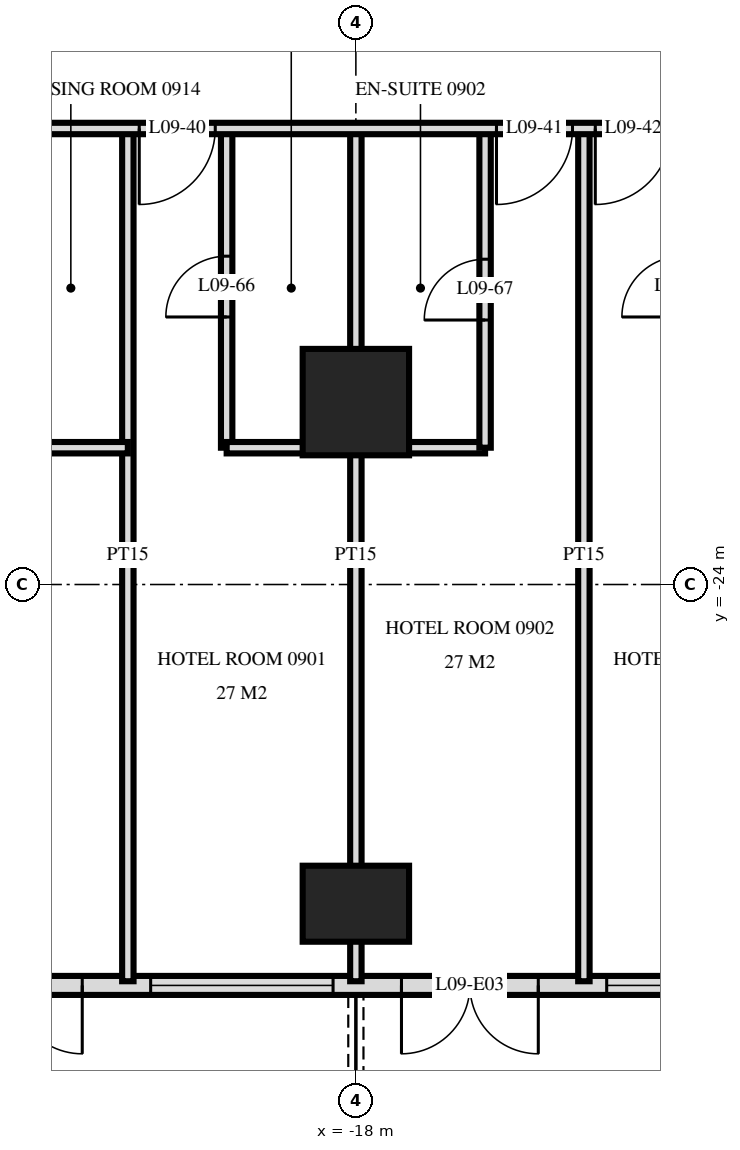
"""IFC4 building model, lengths in metres.
Left out: names, types, materials, properties, quantities, classifications, styles, units other than length and angle.
Written with IfcOpenShell. Run it as: python <this file> out.ifc"""

import sys

from ifc_helpers import new_model, si_unit, direction, frame, frame_2d, origin, origin_2d, place, context, subcontext, project, spatial, rectangle, extrude, element, fill, save


model = new_model("IFC4")
c1 = context("Model", 3, precision=1e-05, world=origin(), true_north=direction((0.0, 1.0)))
c2 = subcontext(c1, "Body", "Model", "MODEL_VIEW")
j1 = project(units=[si_unit("LENGTHUNIT", "METRE"), si_unit("PLANEANGLEUNIT", "RADIAN")], contexts=[c1])
p1 = place(None, origin())
s1 = spatial("IfcSite", under=j1, at=p1, CompositionType="ELEMENT")
p2 = place(p1, origin())
s2 = spatial("IfcBuilding", under=s1, at=p2, CompositionType="ELEMENT")
p3 = place(p2, frame((0.0, 0.0, 42.0)))
s3 = spatial("IfcBuildingStorey", under=s2, at=p3, CompositionType="ELEMENT", Elevation=42.0)
p4 = place(p3, frame((-18.0, -28.2, 0.0), z_axis=(0.0, 0.0, 1.0), x_axis=(1.0, 0.0, 0.0)))
e1 = element("IfcColumn", 1, at=p4, inside=s3, PredefinedType="COLUMN", context=c2, shape_type="SweptSolid", body=[
    extrude(rectangle(XDim=1.4, YDim=1.0, at=origin_2d()), origin(), (0.0, 0.0, 1.0), 3.6),
])
p5 = place(p3, frame((-18.0, -21.6, 0.0), z_axis=(0.0, 0.0, 1.0), x_axis=(1.0, 0.0, 0.0)))
e2 = element("IfcColumn", 2, at=p5, inside=s3, PredefinedType="COLUMN", context=c2, shape_type="SweptSolid", body=[
    extrude(rectangle(XDim=1.4, YDim=1.4, at=origin_2d()), origin(), (0.0, 0.0, 1.0), 3.6),
])
p6 = place(p3, frame((-28.775, -29.275, 0.0), z_axis=(0.0, 0.0, 1.0), x_axis=(1.0, 0.0, 0.0)))
e3 = element("IfcWall", 3, at=p6, inside=s3, PredefinedType="SOLIDWALL", context=c2, shape_type="SweptSolid", body=[
    extrude(rectangle(XDim=57.551, YDim=0.25, at=frame_2d((28.775, 0.0))), origin(), (0.0, 0.0, 1.0), 3.32),
])
p7 = place(p6, frame((0.575, 0.0, 0.0)))
e4 = element("IfcOpeningElement", 4, at=p7, cuts=e3, PredefinedType="OPENING", context=c2, shape_type="SweptSolid", body=[
    extrude(rectangle(XDim=1.8, YDim=2.4, at=frame_2d((0.9, 1.2))), frame((0.0, 0.135, 0.0), z_axis=(0.0, -1.0, 0.0), x_axis=(1.0, 0.0, 0.0)), (0.0, 0.0, 1.0), 0.27),
])
p8 = place(p6, frame((5.375, 0.0, 0.0)))
e5 = element("IfcOpeningElement", 5, at=p8, cuts=e3, PredefinedType="OPENING", context=c2, shape_type="SweptSolid", body=[
    extrude(rectangle(XDim=1.8, YDim=2.4, at=frame_2d((0.9, 1.2))), frame((0.0, 0.135, 0.0), z_axis=(0.0, -1.0, 0.0), x_axis=(1.0, 0.0, 0.0)), (0.0, 0.0, 1.0), 0.27),
])
p9 = place(p6, frame((8.075, 0.0, 0.3)))
e6 = element("IfcOpeningElement", 6, at=p9, cuts=e3, PredefinedType="OPENING", context=c2, shape_type="SweptSolid", body=[
    extrude(rectangle(XDim=2.4, YDim=2.1, at=frame_2d((1.2, 1.05))), frame((0.0, 0.135, 0.0), z_axis=(0.0, -1.0, 0.0), x_axis=(1.0, 0.0, 0.0)), (0.0, 0.0, 1.0), 0.27),
])
p10 = place(p6, frame((11.375, 0.0, 0.0)))
e7 = element("IfcOpeningElement", 7, at=p10, cuts=e3, PredefinedType="OPENING", context=c2, shape_type="SweptSolid", body=[
    extrude(rectangle(XDim=1.8, YDim=2.4, at=frame_2d((0.9, 1.2))), frame((0.0, 0.135, 0.0), z_axis=(0.0, -1.0, 0.0), x_axis=(1.0, 0.0, 0.0)), (0.0, 0.0, 1.0), 0.27),
])
p11 = place(p6, frame((14.075, 0.0, 0.3)))
e8 = element("IfcOpeningElement", 8, at=p11, cuts=e3, PredefinedType="OPENING", context=c2, shape_type="SweptSolid", body=[
    extrude(rectangle(XDim=2.4, YDim=2.1, at=frame_2d((1.2, 1.05))), frame((0.0, 0.135, 0.0), z_axis=(0.0, -1.0, 0.0), x_axis=(1.0, 0.0, 0.0)), (0.0, 0.0, 1.0), 0.27),
])
p12 = place(p6, frame((17.375, 0.0, 0.0)))
e9 = element("IfcOpeningElement", 9, at=p12, cuts=e3, PredefinedType="OPENING", context=c2, shape_type="SweptSolid", body=[
    extrude(rectangle(XDim=1.8, YDim=2.4, at=frame_2d((0.9, 1.2))), frame((0.0, 0.135, 0.0), z_axis=(0.0, -1.0, 0.0), x_axis=(1.0, 0.0, 0.0)), (0.0, 0.0, 1.0), 0.27),
])
p13 = place(p6, frame((20.075, 0.0, 0.3)))
e10 = element("IfcOpeningElement", 10, at=p13, cuts=e3, PredefinedType="OPENING", context=c2, shape_type="SweptSolid", body=[
    extrude(rectangle(XDim=2.4, YDim=2.1, at=frame_2d((1.2, 1.05))), frame((0.0, 0.135, 0.0), z_axis=(0.0, -1.0, 0.0), x_axis=(1.0, 0.0, 0.0)), (0.0, 0.0, 1.0), 0.27),
])
p14 = place(p6, frame((23.075, 0.0, 0.3)))
e11 = element("IfcOpeningElement", 11, at=p14, cuts=e3, PredefinedType="OPENING", context=c2, shape_type="SweptSolid", body=[
    extrude(rectangle(XDim=2.4, YDim=2.1, at=frame_2d((1.2, 1.05))), frame((0.0, 0.135, 0.0), z_axis=(0.0, -1.0, 0.0), x_axis=(1.0, 0.0, 0.0)), (0.0, 0.0, 1.0), 0.27),
])
p15 = place(p6, frame((26.375, 0.0, 0.0)))
e12 = element("IfcOpeningElement", 12, at=p15, cuts=e3, PredefinedType="OPENING", context=c2, shape_type="SweptSolid", body=[
    extrude(rectangle(XDim=1.8, YDim=2.4, at=frame_2d((0.9, 1.2))), frame((0.0, 0.135, 0.0), z_axis=(0.0, -1.0, 0.0), x_axis=(1.0, 0.0, 0.0)), (0.0, 0.0, 1.0), 0.27),
])
p16 = place(p6, frame((29.375, 0.0, 0.0)))
e13 = element("IfcOpeningElement", 13, at=p16, cuts=e3, PredefinedType="OPENING", context=c2, shape_type="SweptSolid", body=[
    extrude(rectangle(XDim=1.8, YDim=2.4, at=frame_2d((0.9, 1.2))), frame((0.0, 0.135, 0.0), z_axis=(0.0, -1.0, 0.0), x_axis=(1.0, 0.0, 0.0)), (0.0, 0.0, 1.0), 0.27),
])
p17 = place(p6, frame((32.075, 0.0, 0.3)))
e14 = element("IfcOpeningElement", 14, at=p17, cuts=e3, PredefinedType="OPENING", context=c2, shape_type="SweptSolid", body=[
    extrude(rectangle(XDim=2.4, YDim=2.1, at=frame_2d((1.2, 1.05))), frame((0.0, 0.135, 0.0), z_axis=(0.0, -1.0, 0.0), x_axis=(1.0, 0.0, 0.0)), (0.0, 0.0, 1.0), 0.27),
])
p18 = place(p6, frame((35.375, 0.0, 0.0)))
e15 = element("IfcOpeningElement", 15, at=p18, cuts=e3, PredefinedType="OPENING", context=c2, shape_type="SweptSolid", body=[
    extrude(rectangle(XDim=1.8, YDim=2.4, at=frame_2d((0.9, 1.2))), frame((0.0, 0.135, 0.0), z_axis=(0.0, -1.0, 0.0), x_axis=(1.0, 0.0, 0.0)), (0.0, 0.0, 1.0), 0.27),
])
p19 = place(p6, frame((38.075, 0.0, 0.3)))
e16 = element("IfcOpeningElement", 16, at=p19, cuts=e3, PredefinedType="OPENING", context=c2, shape_type="SweptSolid", body=[
    extrude(rectangle(XDim=2.4, YDim=2.1, at=frame_2d((1.2, 1.05))), frame((0.0, 0.135, 0.0), z_axis=(0.0, -1.0, 0.0), x_axis=(1.0, 0.0, 0.0)), (0.0, 0.0, 1.0), 0.27),
])
p20 = place(p6, frame((41.375, 0.0, 0.0)))
e17 = element("IfcOpeningElement", 17, at=p20, cuts=e3, PredefinedType="OPENING", context=c2, shape_type="SweptSolid", body=[
    extrude(rectangle(XDim=1.8, YDim=2.4, at=frame_2d((0.9, 1.2))), frame((0.0, 0.135, 0.0), z_axis=(0.0, -1.0, 0.0), x_axis=(1.0, 0.0, 0.0)), (0.0, 0.0, 1.0), 0.27),
])
p21 = place(p6, frame((44.075, 0.0, 0.3)))
e18 = element("IfcOpeningElement", 18, at=p21, cuts=e3, PredefinedType="OPENING", context=c2, shape_type="SweptSolid", body=[
    extrude(rectangle(XDim=2.4, YDim=2.1, at=frame_2d((1.2, 1.05))), frame((0.0, 0.135, 0.0), z_axis=(0.0, -1.0, 0.0), x_axis=(1.0, 0.0, 0.0)), (0.0, 0.0, 1.0), 0.27),
])
p22 = place(p6, frame((47.375, 0.0, 0.0)))
e19 = element("IfcOpeningElement", 19, at=p22, cuts=e3, PredefinedType="OPENING", context=c2, shape_type="SweptSolid", body=[
    extrude(rectangle(XDim=1.8, YDim=2.4, at=frame_2d((0.9, 1.2))), frame((0.0, 0.135, 0.0), z_axis=(0.0, -1.0, 0.0), x_axis=(1.0, 0.0, 0.0)), (0.0, 0.0, 1.0), 0.27),
])
p23 = place(p6, frame((50.075, 0.0, 0.3)))
e20 = element("IfcOpeningElement", 20, at=p23, cuts=e3, PredefinedType="OPENING", context=c2, shape_type="SweptSolid", body=[
    extrude(rectangle(XDim=2.4, YDim=2.1, at=frame_2d((1.2, 1.05))), frame((0.0, 0.135, 0.0), z_axis=(0.0, -1.0, 0.0), x_axis=(1.0, 0.0, 0.0)), (0.0, 0.0, 1.0), 0.27),
])
p24 = place(p6, frame((53.375, 0.0, 0.0)))
e21 = element("IfcOpeningElement", 21, at=p24, cuts=e3, PredefinedType="OPENING", context=c2, shape_type="SweptSolid", body=[
    extrude(rectangle(XDim=1.8, YDim=2.4, at=frame_2d((0.9, 1.2))), frame((0.0, 0.135, 0.0), z_axis=(0.0, -1.0, 0.0), x_axis=(1.0, 0.0, 0.0)), (0.0, 0.0, 1.0), 0.27),
])
p25 = place(p3, frame((-15.0, -29.22, 0.0), z_axis=(0.0, 0.0, 1.0), x_axis=(0.0, 1.0, 0.0)))
e22 = element("IfcWall", 22, at=p25, inside=s3, PredefinedType="PARTITIONING", context=c2, shape_type="SweptSolid", body=[
    extrude(rectangle(XDim=11.22, YDim=0.15, at=frame_2d((5.61, 0.0))), origin(), (0.0, 0.0, 1.0), 3.32),
])
p26 = place(p3, frame((-16.3, -22.2, 0.0), z_axis=(0.0, 0.0, 1.0), x_axis=(0.0, 1.0, 0.0)))
e23 = element("IfcWall", 23, at=p26, inside=s3, PredefinedType="PARTITIONING", context=c2, shape_type="SweptSolid", body=[
    extrude(rectangle(XDim=4.2, YDim=0.15, at=frame_2d((2.1, 0.0))), origin(), (0.0, 0.0, 1.0), 3.32),
])
p27 = place(p26, frame((1.68, 0.0, 0.0)))
e24 = element("IfcOpeningElement", 24, at=p27, cuts=e23, PredefinedType="OPENING", context=c2, shape_type="SweptSolid", body=[
    extrude(rectangle(XDim=0.8, YDim=2.1, at=frame_2d((0.4, 1.05))), frame((0.0, 0.085, 0.0), z_axis=(0.0, -1.0, 0.0), x_axis=(1.0, 0.0, 0.0)), (0.0, 0.0, 1.0), 0.17),
])
p28 = place(p3, frame((-18.0, -29.22, 0.0), z_axis=(0.0, 0.0, 1.0), x_axis=(0.0, 1.0, 0.0)))
e25 = element("IfcWall", 25, at=p28, inside=s3, PredefinedType="PARTITIONING", context=c2, shape_type="SweptSolid", body=[
    extrude(rectangle(XDim=11.22, YDim=0.15, at=frame_2d((5.61, 0.0))), origin(), (0.0, 0.0, 1.0), 3.32),
])
p29 = place(p3, frame((-19.7, -22.2, 0.0), z_axis=(0.0, 0.0, 1.0), x_axis=(0.0, 1.0, 0.0)))
e26 = element("IfcWall", 26, at=p29, inside=s3, PredefinedType="PARTITIONING", context=c2, shape_type="SweptSolid", body=[
    extrude(rectangle(XDim=4.2, YDim=0.15, at=frame_2d((2.1, 0.0))), origin(), (0.0, 0.0, 1.0), 3.32),
])
p30 = place(p29, frame((1.72, 0.0, 0.0)))
e27 = element("IfcOpeningElement", 27, at=p30, cuts=e26, PredefinedType="OPENING", context=c2, shape_type="SweptSolid", body=[
    extrude(rectangle(XDim=0.8, YDim=2.1, at=frame_2d((0.4, 1.05))), frame((0.0, 0.085, 0.0), z_axis=(0.0, -1.0, 0.0), x_axis=(1.0, 0.0, 0.0)), (0.0, 0.0, 1.0), 0.17),
])
p31 = place(p3, frame((-21.0, -29.22, 0.0), z_axis=(0.0, 0.0, 1.0), x_axis=(0.0, 1.0, 0.0)))
e28 = element("IfcWall", 28, at=p31, inside=s3, PredefinedType="PARTITIONING", context=c2, shape_type="SweptSolid", body=[
    extrude(rectangle(XDim=11.22, YDim=0.15, at=frame_2d((5.61, 0.0))), origin(), (0.0, 0.0, 1.0), 3.32),
])
p32 = place(p3, frame((-22.5, -22.2, 0.0), z_axis=(0.0, 0.0, 1.0), x_axis=(1.0, 0.0, 0.0)))
e29 = element("IfcWall", 29, at=p32, inside=s3, PredefinedType="PARTITIONING", context=c2, shape_type="SweptSolid", body=[
    extrude(rectangle(XDim=1.5, YDim=0.15, at=frame_2d((0.75, 0.0))), origin(), (0.0, 0.0, 1.0), 3.32),
])
p33 = place(p3, frame((-19.7, -22.2, 0.0), z_axis=(0.0, 0.0, 1.0), x_axis=(1.0, 0.0, 0.0)))
e30 = element("IfcWall", 30, at=p33, inside=s3, PredefinedType="PARTITIONING", context=c2, shape_type="SweptSolid", body=[
    extrude(rectangle(XDim=3.4, YDim=0.15, at=frame_2d((1.7, 0.0))), origin(), (0.0, 0.0, 1.0), 3.32),
])
p34 = place(p3, frame((-33.12, -18.0, 0.0), z_axis=(0.0, 0.0, 1.0), x_axis=(1.0, 0.0, 0.0)))
e31 = element("IfcWall", 31, at=p34, inside=s3, PredefinedType="PARTITIONING", context=c2, shape_type="SweptSolid", body=[
    extrude(rectangle(XDim=66.24, YDim=0.15, at=frame_2d((33.12, 0.0))), origin(), (0.0, 0.0, 1.0), 3.32),
])
p35 = place(p34, frame((12.27, 0.0, 0.0)))
e32 = element("IfcOpeningElement", 32, at=p35, cuts=e31, PredefinedType="OPENING", context=c2, shape_type="SweptSolid", body=[
    extrude(rectangle(XDim=1.0, YDim=2.1, at=frame_2d((0.5, 1.05))), frame((0.0, 0.085, 0.0), z_axis=(0.0, -1.0, 0.0), x_axis=(1.0, 0.0, 0.0)), (0.0, 0.0, 1.0), 0.17),
])
p36 = place(p34, frame((16.97, 0.0, 0.0)))
e33 = element("IfcOpeningElement", 33, at=p36, cuts=e31, PredefinedType="OPENING", context=c2, shape_type="SweptSolid", body=[
    extrude(rectangle(XDim=1.0, YDim=2.1, at=frame_2d((0.5, 1.05))), frame((0.0, 0.085, 0.0), z_axis=(0.0, -1.0, 0.0), x_axis=(1.0, 0.0, 0.0)), (0.0, 0.0, 1.0), 0.17),
])
p37 = place(p34, frame((18.27, 0.0, 0.0)))
e34 = element("IfcOpeningElement", 34, at=p37, cuts=e31, PredefinedType="OPENING", context=c2, shape_type="SweptSolid", body=[
    extrude(rectangle(XDim=1.0, YDim=2.1, at=frame_2d((0.5, 1.05))), frame((0.0, 0.085, 0.0), z_axis=(0.0, -1.0, 0.0), x_axis=(1.0, 0.0, 0.0)), (0.0, 0.0, 1.0), 0.17),
])
p38 = place(p34, frame((22.97, 0.0, 0.0)))
e35 = element("IfcOpeningElement", 35, at=p38, cuts=e31, PredefinedType="OPENING", context=c2, shape_type="SweptSolid", body=[
    extrude(rectangle(XDim=1.0, YDim=2.1, at=frame_2d((0.5, 1.05))), frame((0.0, 0.085, 0.0), z_axis=(0.0, -1.0, 0.0), x_axis=(1.0, 0.0, 0.0)), (0.0, 0.0, 1.0), 0.17),
])
p39 = place(p34, frame((24.27, 0.0, 0.0)))
e36 = element("IfcOpeningElement", 36, at=p39, cuts=e31, PredefinedType="OPENING", context=c2, shape_type="SweptSolid", body=[
    extrude(rectangle(XDim=1.0, YDim=2.1, at=frame_2d((0.5, 1.05))), frame((0.0, 0.085, 0.0), z_axis=(0.0, -1.0, 0.0), x_axis=(1.0, 0.0, 0.0)), (0.0, 0.0, 1.0), 0.17),
])
p40 = place(p34, frame((28.97, 0.0, 0.0)))
e37 = element("IfcOpeningElement", 37, at=p40, cuts=e31, PredefinedType="OPENING", context=c2, shape_type="SweptSolid", body=[
    extrude(rectangle(XDim=1.0, YDim=2.1, at=frame_2d((0.5, 1.05))), frame((0.0, 0.085, 0.0), z_axis=(0.0, -1.0, 0.0), x_axis=(1.0, 0.0, 0.0)), (0.0, 0.0, 1.0), 0.17),
])
p41 = place(p34, frame((30.27, 0.0, 0.0)))
e38 = element("IfcOpeningElement", 38, at=p41, cuts=e31, PredefinedType="OPENING", context=c2, shape_type="SweptSolid", body=[
    extrude(rectangle(XDim=1.0, YDim=2.1, at=frame_2d((0.5, 1.05))), frame((0.0, 0.085, 0.0), z_axis=(0.0, -1.0, 0.0), x_axis=(1.0, 0.0, 0.0)), (0.0, 0.0, 1.0), 0.17),
])
p42 = place(p34, frame((34.97, 0.0, 0.0)))
e39 = element("IfcOpeningElement", 39, at=p42, cuts=e31, PredefinedType="OPENING", context=c2, shape_type="SweptSolid", body=[
    extrude(rectangle(XDim=1.0, YDim=2.1, at=frame_2d((0.5, 1.05))), frame((0.0, 0.085, 0.0), z_axis=(0.0, -1.0, 0.0), x_axis=(1.0, 0.0, 0.0)), (0.0, 0.0, 1.0), 0.17),
])
p43 = place(p34, frame((37.27, 0.0, 0.0)))
e40 = element("IfcOpeningElement", 40, at=p43, cuts=e31, PredefinedType="OPENING", context=c2, shape_type="SweptSolid", body=[
    extrude(rectangle(XDim=1.0, YDim=2.1, at=frame_2d((0.5, 1.05))), frame((0.0, 0.085, 0.0), z_axis=(0.0, -1.0, 0.0), x_axis=(1.0, 0.0, 0.0)), (0.0, 0.0, 1.0), 0.17),
])
p44 = place(p34, frame((43.97, 0.0, 0.0)))
e41 = element("IfcOpeningElement", 41, at=p44, cuts=e31, PredefinedType="OPENING", context=c2, shape_type="SweptSolid", body=[
    extrude(rectangle(XDim=1.0, YDim=2.1, at=frame_2d((0.5, 1.05))), frame((0.0, 0.085, 0.0), z_axis=(0.0, -1.0, 0.0), x_axis=(1.0, 0.0, 0.0)), (0.0, 0.0, 1.0), 0.17),
])
p45 = place(p34, frame((45.27, 0.0, 0.0)))
e42 = element("IfcOpeningElement", 42, at=p45, cuts=e31, PredefinedType="OPENING", context=c2, shape_type="SweptSolid", body=[
    extrude(rectangle(XDim=1.0, YDim=2.1, at=frame_2d((0.5, 1.05))), frame((0.0, 0.085, 0.0), z_axis=(0.0, -1.0, 0.0), x_axis=(1.0, 0.0, 0.0)), (0.0, 0.0, 1.0), 0.17),
])
p46 = place(p34, frame((51.22, 0.0, 0.0)))
e43 = element("IfcOpeningElement", 43, at=p46, cuts=e31, PredefinedType="OPENING", context=c2, shape_type="SweptSolid", body=[
    extrude(rectangle(XDim=1.0, YDim=2.1, at=frame_2d((0.5, 1.05))), frame((0.0, 0.085, 0.0), z_axis=(0.0, -1.0, 0.0), x_axis=(1.0, 0.0, 0.0)), (0.0, 0.0, 1.0), 0.17),
])
p47 = place(p34, frame((54.27, 0.0, 0.0)))
e44 = element("IfcOpeningElement", 44, at=p47, cuts=e31, PredefinedType="OPENING", context=c2, shape_type="SweptSolid", body=[
    extrude(rectangle(XDim=1.0, YDim=2.1, at=frame_2d((0.5, 1.05))), frame((0.0, 0.085, 0.0), z_axis=(0.0, -1.0, 0.0), x_axis=(1.0, 0.0, 0.0)), (0.0, 0.0, 1.0), 0.17),
])
p48 = place(p34, frame((6.07, 0.0, 0.0)))
e45 = element("IfcOpeningElement", 45, at=p48, cuts=e31, PredefinedType="OPENING", context=c2, shape_type="SweptSolid", body=[
    extrude(rectangle(XDim=1.0, YDim=2.1, at=frame_2d((0.5, 1.05))), frame((0.0, 0.085, 0.0), z_axis=(0.0, -1.0, 0.0), x_axis=(1.0, 0.0, 0.0)), (0.0, 0.0, 1.0), 0.17),
])
p49 = place(p34, frame((63.37, 0.0, 0.0)))
e46 = element("IfcOpeningElement", 46, at=p49, cuts=e31, PredefinedType="OPENING", context=c2, shape_type="SweptSolid", body=[
    extrude(rectangle(XDim=1.0, YDim=2.1, at=frame_2d((0.5, 1.05))), frame((0.0, 0.085, 0.0), z_axis=(0.0, -1.0, 0.0), x_axis=(1.0, 0.0, 0.0)), (0.0, 0.0, 1.0), 0.17),
])
p50 = place(p8, frame((0.9, 0.0, 0.0), z_axis=(0.0, 0.0, 1.0), x_axis=(-1.0, 0.0, 0.0)))
e47 = element("IfcDoor", 47, at=p50, inside=s3, OperationType="DOUBLE_DOOR_SINGLE_SWING", PredefinedType="DOOR", context=c2, shape_type="SweptSolid", body=[
    extrude(rectangle(XDim=1.8, YDim=2.4, at=frame_2d((0.0, 1.2))), frame((0.0, -0.025, 0.0), z_axis=(0.0, 1.0, 0.0), x_axis=(-1.0, 0.0, 0.0)), (0.0, 0.0, 1.0), 0.05),
])
fill(e5, e47)
p51 = place(p9, origin())
e48 = element("IfcWindow", 48, at=p51, inside=s3, PartitioningType="SINGLE_PANEL", PredefinedType="WINDOW", context=c2, shape_type="SweptSolid", body=[
    extrude(rectangle(XDim=2.4, YDim=2.1, at=frame_2d((1.2, 1.05))), frame((0.0, 0.03, 0.0), z_axis=(0.0, -1.0, 0.0), x_axis=(1.0, 0.0, 0.0)), (0.0, 0.0, 1.0), 0.06),
])
fill(e6, e48)
p52 = place(p10, frame((0.9, 0.0, 0.0), z_axis=(0.0, 0.0, 1.0), x_axis=(-1.0, 0.0, 0.0)))
e49 = element("IfcDoor", 49, at=p52, inside=s3, OperationType="DOUBLE_DOOR_SINGLE_SWING", PredefinedType="DOOR", context=c2, shape_type="SweptSolid", body=[
    extrude(rectangle(XDim=1.8, YDim=2.4, at=frame_2d((0.0, 1.2))), frame((0.0, -0.025, 0.0), z_axis=(0.0, 1.0, 0.0), x_axis=(-1.0, 0.0, 0.0)), (0.0, 0.0, 1.0), 0.05),
])
fill(e7, e49)
p53 = place(p11, origin())
e50 = element("IfcWindow", 50, at=p53, inside=s3, PartitioningType="SINGLE_PANEL", PredefinedType="WINDOW", context=c2, shape_type="SweptSolid", body=[
    extrude(rectangle(XDim=2.4, YDim=2.1, at=frame_2d((1.2, 1.05))), frame((0.0, 0.03, 0.0), z_axis=(0.0, -1.0, 0.0), x_axis=(1.0, 0.0, 0.0)), (0.0, 0.0, 1.0), 0.06),
])
fill(e8, e50)
p54 = place(p35, frame((0.5, 0.0, 0.0), z_axis=(0.0, 0.0, 1.0), x_axis=(-1.0, 0.0, 0.0)))
e51 = element("IfcDoor", 51, at=p54, inside=s3, OperationType="SINGLE_SWING_LEFT", PredefinedType="DOOR", context=c2, shape_type="SweptSolid", body=[
    extrude(rectangle(XDim=1.0, YDim=2.1, at=frame_2d((0.0, 1.05))), frame((0.0, -0.025, 0.0), z_axis=(0.0, 1.0, 0.0), x_axis=(-1.0, 0.0, 0.0)), (0.0, 0.0, 1.0), 0.05),
])
fill(e32, e51)
p55 = place(p36, frame((0.5, 0.0, 0.0), z_axis=(0.0, 0.0, 1.0), x_axis=(-1.0, 0.0, 0.0)))
e52 = element("IfcDoor", 52, at=p55, inside=s3, OperationType="SINGLE_SWING_LEFT", PredefinedType="DOOR", context=c2, shape_type="SweptSolid", body=[
    extrude(rectangle(XDim=1.0, YDim=2.1, at=frame_2d((0.0, 1.05))), frame((0.0, -0.025, 0.0), z_axis=(0.0, 1.0, 0.0), x_axis=(-1.0, 0.0, 0.0)), (0.0, 0.0, 1.0), 0.05),
])
fill(e33, e52)
p56 = place(p37, frame((0.5, 0.0, 0.0), z_axis=(0.0, 0.0, 1.0), x_axis=(-1.0, 0.0, 0.0)))
e53 = element("IfcDoor", 53, at=p56, inside=s3, OperationType="SINGLE_SWING_LEFT", PredefinedType="DOOR", context=c2, shape_type="SweptSolid", body=[
    extrude(rectangle(XDim=1.0, YDim=2.1, at=frame_2d((0.0, 1.05))), frame((0.0, -0.025, 0.0), z_axis=(0.0, 1.0, 0.0), x_axis=(-1.0, 0.0, 0.0)), (0.0, 0.0, 1.0), 0.05),
])
fill(e34, e53)
p57 = place(p30, origin())
e54 = element("IfcDoor", 54, at=p57, inside=s3, OperationType="SINGLE_SWING_RIGHT", PredefinedType="DOOR", context=c2, shape_type="SweptSolid", body=[
    extrude(rectangle(XDim=0.8, YDim=2.1, at=frame_2d((0.4, 1.05))), frame((0.0, 0.025, 0.0), z_axis=(0.0, -1.0, 0.0), x_axis=(1.0, 0.0, 0.0)), (0.0, 0.0, 1.0), 0.05),
])
fill(e27, e54)
p58 = place(p27, origin())
e55 = element("IfcDoor", 55, at=p58, inside=s3, OperationType="SINGLE_SWING_RIGHT", PredefinedType="DOOR", context=c2, shape_type="SweptSolid", body=[
    extrude(rectangle(XDim=0.8, YDim=2.1, at=frame_2d((0.4, 1.05))), frame((0.0, 0.025, 0.0), z_axis=(0.0, -1.0, 0.0), x_axis=(1.0, 0.0, 0.0)), (0.0, 0.0, 1.0), 0.05),
])
fill(e24, e55)
save(model, sys.argv[1])
